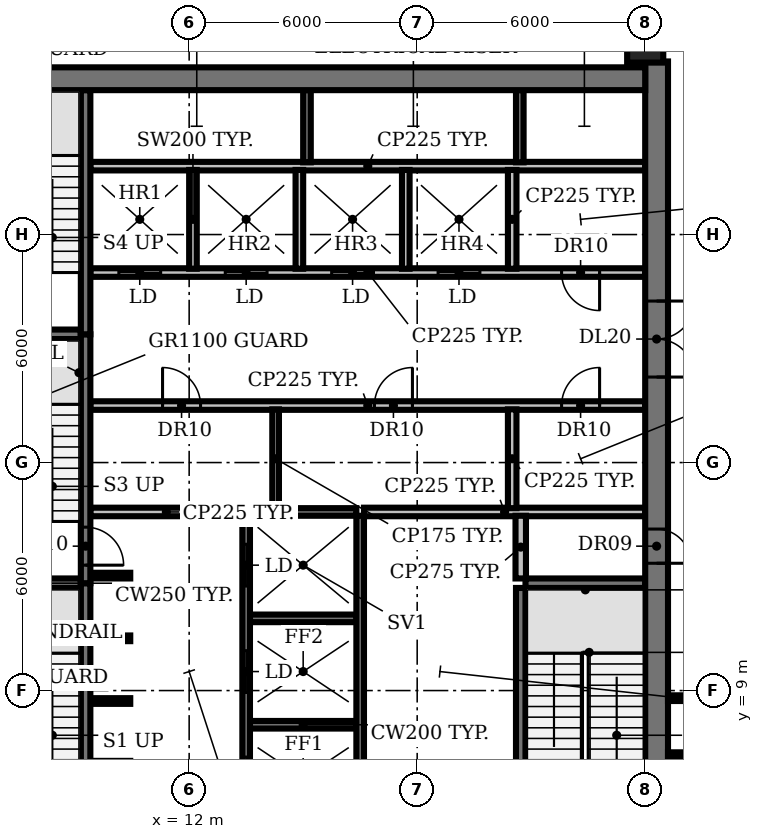
"""IFC4 building model, lengths in metres.
Left out: names, types, materials, properties, quantities, classifications, styles, units other than length and angle.
Written with IfcOpenShell. Run it as: python <this file> out.ifc"""

import sys

from ifc_helpers import new_model, si_unit, direction, frame, frame_2d, origin, origin_2d, place, context, subcontext, project, spatial, rectangle, circle, extrude, element, fill, save


model = new_model("IFC4")
c1 = context("Model", 3, precision=1e-05, world=origin(), true_north=direction((0.0, 1.0)))
c2 = subcontext(c1, "Body", "Model", "MODEL_VIEW")
j1 = project(units=[si_unit("LENGTHUNIT", "METRE"), si_unit("PLANEANGLEUNIT", "RADIAN")], contexts=[c1])
p1 = place(None, origin())
s1 = spatial("IfcSite", under=j1, at=p1, CompositionType="ELEMENT")
p2 = place(p1, origin())
s2 = spatial("IfcBuilding", under=s1, at=p2, CompositionType="ELEMENT")
p3 = place(p2, frame((0.0, 0.0, 184.4)))
s3 = spatial("IfcBuildingStorey", under=s2, at=p3, CompositionType="ELEMENT", Elevation=184.4)
p4 = place(p3, frame((24.0, 26.0, 0.0), z_axis=(0.0, 0.0, 1.0), x_axis=(1.0, 0.0, 0.0)))
e1 = element("IfcColumn", 1, at=p4, inside=s3, PredefinedType="COLUMN", context=c2, shape_type="SweptSolid", body=[
    extrude(circle(Radius=0.475, at=origin_2d()), origin(), (0.0, 0.0, 1.0), 3.85),
])
p5 = place(p3, frame((13.6, 8.1, 0.0), z_axis=(0.0, 0.0, 1.0), x_axis=(1.0, 0.0, 0.0)))
e2 = element("IfcWall", 2, at=p5, inside=s3, PredefinedType="SHEAR", context=c2, shape_type="SweptSolid", body=[
    extrude(rectangle(XDim=2.8, YDim=0.2, at=frame_2d((1.4, 0.0))), origin(), (0.0, 0.0, 1.0), 3.85),
])
for number, where, z_axis, x_axis in (
    (3, (9.4, 8.725, 0.0), (0.0, 0.0, 1.0), (1.0, 0.0, 0.0)),
    (4, (9.4, 10.375, 0.0), (0.0, 0.0, 1.0), (1.0, 0.0, 0.0)),
):
    element("IfcWall", number, at=place(p3, frame(where, z_axis=z_axis, x_axis=x_axis)), inside=s3, PredefinedType="SHEAR", context=c2, shape_type="SweptSolid", body=[
        extrude(rectangle(XDim=1.05, YDim=0.15, at=frame_2d((0.525, 0.0))), origin(), (0.0, 0.0, 1.0), 3.85),
    ])
p6 = place(p3, frame((13.6, 10.9, 0.0), z_axis=(0.0, 0.0, 1.0), x_axis=(1.0, 0.0, 0.0)))
e5 = element("IfcWall", 5, at=p6, inside=s3, PredefinedType="SHEAR", context=c2, shape_type="SweptSolid", body=[
    extrude(rectangle(XDim=2.8, YDim=0.2, at=frame_2d((1.4, 0.0))), origin(), (0.0, 0.0, 1.0), 3.85),
])
for number, where, z_axis, x_axis in (
    (6, (6.0, 11.825, 0.0), (0.0, 0.0, 1.0), (1.0, 0.0, 0.0)),
    (7, (20.85, 11.825, 0.0), (0.0, 0.0, 1.0), (1.0, 0.0, 0.0)),
):
    element("IfcWall", number, at=place(p3, frame(where, z_axis=z_axis, x_axis=x_axis)), inside=s3, PredefinedType="SHEAR", context=c2, shape_type="SweptSolid", body=[
        extrude(rectangle(XDim=3.15, YDim=0.25, at=frame_2d((1.575, 0.0))), origin(), (0.0, 0.0, 1.0), 3.85),
    ])
p7 = place(p3, frame((9.4, 12.025, 0.0), z_axis=(0.0, 0.0, 1.0), x_axis=(1.0, 0.0, 0.0)))
e8 = element("IfcWall", 8, at=p7, inside=s3, PredefinedType="SHEAR", context=c2, shape_type="SweptSolid", body=[
    extrude(rectangle(XDim=1.05, YDim=0.15, at=frame_2d((0.525, 0.0))), origin(), (0.0, 0.0, 1.0), 3.85),
])
p8 = place(p3, frame((9.4, 13.7, 0.0), z_axis=(0.0, 0.0, 1.0), x_axis=(1.0, 0.0, 0.0)))
e9 = element("IfcWall", 9, at=p8, inside=s3, PredefinedType="PARTITIONING", context=c2, shape_type="SweptSolid", body=[
    extrude(rectangle(XDim=4.0, YDim=0.225, at=frame_2d((2.0, 0.0))), origin(), (0.0, 0.0, 1.0), 3.85),
])
p9 = place(p3, frame((13.6, 13.7, 0.0), z_axis=(0.0, 0.0, 1.0), x_axis=(1.0, 0.0, 0.0)))
e10 = element("IfcWall", 10, at=p9, inside=s3, PredefinedType="SHEAR", context=c2, shape_type="SweptSolid", body=[
    extrude(rectangle(XDim=2.8, YDim=0.2, at=frame_2d((1.4, 0.0))), origin(), (0.0, 0.0, 1.0), 3.85),
])
p10 = place(p3, frame((16.6, 13.7, 0.0), z_axis=(0.0, 0.0, 1.0), x_axis=(1.0, 0.0, 0.0)))
e11 = element("IfcWall", 11, at=p10, inside=s3, PredefinedType="PARTITIONING", context=c2, shape_type="SweptSolid", body=[
    extrude(rectangle(XDim=7.4, YDim=0.225, at=frame_2d((3.7, 0.0))), origin(), (0.0, 0.0, 1.0), 3.85),
])
p11 = place(p3, frame((9.4, 16.5, 0.0), z_axis=(0.0, 0.0, 1.0), x_axis=(1.0, 0.0, 0.0)))
e12 = element("IfcWall", 12, at=p11, inside=s3, PredefinedType="PARTITIONING", context=c2, shape_type="SweptSolid", body=[
    extrude(rectangle(XDim=14.6, YDim=0.225, at=frame_2d((7.3, 0.0))), origin(), (0.0, 0.0, 1.0), 3.85),
])
p12 = place(p11, frame((1.9, 0.0, 0.0)))
e13 = element("IfcOpeningElement", 13, at=p12, cuts=e12, PredefinedType="OPENING", context=c2, shape_type="SweptSolid", body=[
    extrude(rectangle(XDim=1.0, YDim=2.1, at=frame_2d((0.5, 1.05))), frame((0.0, 0.123, 0.0), z_axis=(0.0, -1.0, 0.0), x_axis=(1.0, 0.0, 0.0)), (0.0, 0.0, 1.0), 0.245),
])
p13 = place(p11, frame((7.475, 0.0, 0.0)))
e14 = element("IfcOpeningElement", 14, at=p13, cuts=e12, PredefinedType="OPENING", context=c2, shape_type="SweptSolid", body=[
    extrude(rectangle(XDim=1.0, YDim=2.1, at=frame_2d((0.5, 1.05))), frame((0.0, 0.123, 0.0), z_axis=(0.0, -1.0, 0.0), x_axis=(1.0, 0.0, 0.0)), (0.0, 0.0, 1.0), 0.245),
])
p14 = place(p11, frame((12.4, 0.0, 0.0)))
e15 = element("IfcOpeningElement", 15, at=p14, cuts=e12, PredefinedType="OPENING", context=c2, shape_type="SweptSolid", body=[
    extrude(rectangle(XDim=1.0, YDim=2.1, at=frame_2d((0.5, 1.05))), frame((0.0, 0.123, 0.0), z_axis=(0.0, -1.0, 0.0), x_axis=(1.0, 0.0, 0.0)), (0.0, 0.0, 1.0), 0.245),
])
p15 = place(p3, frame((6.0, 18.375, 0.0), z_axis=(0.0, 0.0, 1.0), x_axis=(1.0, 0.0, 0.0)))
e16 = element("IfcWall", 16, at=p15, inside=s3, PredefinedType="SHEAR", context=c2, shape_type="SweptSolid", body=[
    extrude(rectangle(XDim=3.15, YDim=0.25, at=frame_2d((1.575, 0.0))), origin(), (0.0, 0.0, 1.0), 3.85),
])
p16 = place(p3, frame((24.0, 20.0, 0.0), z_axis=(0.0, 0.0, 1.0), x_axis=(-1.0, 0.0, 0.0)))
e17 = element("IfcWall", 17, at=p16, inside=s3, PredefinedType="PARTITIONING", context=c2, shape_type="SweptSolid", body=[
    extrude(rectangle(XDim=14.6, YDim=0.225, at=frame_2d((7.3, 0.0))), origin(), (0.0, 0.0, 1.0), 3.85),
])
p17 = place(p16, frame((12.75, 0.0, 0.0)))
e18 = element("IfcOpeningElement", 18, at=p17, cuts=e17, PredefinedType="OPENING", context=c2, shape_type="SweptSolid", body=[
    extrude(rectangle(XDim=1.1, YDim=2.1, at=frame_2d((0.55, 1.05))), frame((0.0, 0.123, 0.0), z_axis=(0.0, -1.0, 0.0), x_axis=(1.0, 0.0, 0.0)), (0.0, 0.0, 1.0), 0.245),
])
p18 = place(p16, frame((9.95, 0.0, 0.0)))
e19 = element("IfcOpeningElement", 19, at=p18, cuts=e17, PredefinedType="OPENING", context=c2, shape_type="SweptSolid", body=[
    extrude(rectangle(XDim=1.1, YDim=2.1, at=frame_2d((0.55, 1.05))), frame((0.0, 0.123, 0.0), z_axis=(0.0, -1.0, 0.0), x_axis=(1.0, 0.0, 0.0)), (0.0, 0.0, 1.0), 0.245),
])
p19 = place(p16, frame((7.15, 0.0, 0.0)))
e20 = element("IfcOpeningElement", 20, at=p19, cuts=e17, PredefinedType="OPENING", context=c2, shape_type="SweptSolid", body=[
    extrude(rectangle(XDim=1.1, YDim=2.1, at=frame_2d((0.55, 1.05))), frame((0.0, 0.123, 0.0), z_axis=(0.0, -1.0, 0.0), x_axis=(1.0, 0.0, 0.0)), (0.0, 0.0, 1.0), 0.245),
])
p20 = place(p16, frame((4.35, 0.0, 0.0)))
e21 = element("IfcOpeningElement", 21, at=p20, cuts=e17, PredefinedType="OPENING", context=c2, shape_type="SweptSolid", body=[
    extrude(rectangle(XDim=1.1, YDim=2.1, at=frame_2d((0.55, 1.05))), frame((0.0, 0.123, 0.0), z_axis=(0.0, -1.0, 0.0), x_axis=(1.0, 0.0, 0.0)), (0.0, 0.0, 1.0), 0.245),
])
p21 = place(p16, frame((1.2, 0.0, 0.0)))
e22 = element("IfcOpeningElement", 22, at=p21, cuts=e17, PredefinedType="OPENING", context=c2, shape_type="SweptSolid", body=[
    extrude(rectangle(XDim=1.0, YDim=2.1, at=frame_2d((0.5, 1.05))), frame((0.0, 0.123, 0.0), z_axis=(0.0, -1.0, 0.0), x_axis=(1.0, 0.0, 0.0)), (0.0, 0.0, 1.0), 0.245),
])
p22 = place(p3, frame((9.4, 22.8, 0.0), z_axis=(0.0, 0.0, 1.0), x_axis=(1.0, 0.0, 0.0)))
e23 = element("IfcWall", 23, at=p22, inside=s3, PredefinedType="PARTITIONING", context=c2, shape_type="SweptSolid", body=[
    extrude(rectangle(XDim=14.6, YDim=0.225, at=frame_2d((7.3, 0.0))), origin(), (0.0, 0.0, 1.0), 3.85),
])
p23 = place(p3, frame((9.275, 11.825, 0.0), z_axis=(0.0, 0.0, 1.0), x_axis=(0.0, -1.0, 0.0)))
e24 = element("IfcWall", 24, at=p23, inside=s3, PredefinedType="SHEAR", context=c2, shape_type="SweptSolid", body=[
    extrude(rectangle(XDim=6.425, YDim=0.25, at=frame_2d((3.212, 0.0))), origin(), (0.0, 0.0, 1.0), 3.85),
])
p24 = place(p23, frame((5.075, 0.0, 0.0)))
e25 = element("IfcOpeningElement", 25, at=p24, cuts=e24, PredefinedType="OPENING", context=c2, shape_type="SweptSolid", body=[
    extrude(rectangle(XDim=1.0, YDim=2.1, at=frame_2d((0.5, 1.05))), frame((0.0, 0.135, 0.0), z_axis=(0.0, -1.0, 0.0), x_axis=(1.0, 0.0, 0.0)), (0.0, 0.0, 1.0), 0.27),
])
p25 = place(p3, frame((9.275, 18.375, 0.0), z_axis=(0.0, 0.0, 1.0), x_axis=(0.0, -1.0, 0.0)))
e26 = element("IfcWall", 26, at=p25, inside=s3, PredefinedType="SHEAR", context=c2, shape_type="SweptSolid", body=[
    extrude(rectangle(XDim=6.55, YDim=0.25, at=frame_2d((3.275, 0.0))), origin(), (0.0, 0.0, 1.0), 3.85),
])
p26 = place(p25, frame((5.075, 0.0, 0.0)))
e27 = element("IfcOpeningElement", 27, at=p26, cuts=e26, PredefinedType="OPENING", context=c2, shape_type="SweptSolid", body=[
    extrude(rectangle(XDim=1.0, YDim=2.1, at=frame_2d((0.5, 1.05))), frame((0.0, 0.135, 0.0), z_axis=(0.0, -1.0, 0.0), x_axis=(1.0, 0.0, 0.0)), (0.0, 0.0, 1.0), 0.27),
])
p27 = place(p3, frame((9.275, 18.375, 0.0), z_axis=(0.0, 0.0, 1.0), x_axis=(0.0, 1.0, 0.0)))
e28 = element("IfcWall", 28, at=p27, inside=s3, PredefinedType="SHEAR", context=c2, shape_type="SweptSolid", body=[
    extrude(rectangle(XDim=6.425, YDim=0.25, at=frame_2d((3.212, 0.0))), origin(), (0.0, 0.0, 1.0), 3.85),
])
p28 = place(p3, frame((12.1, 20.1, 0.0), z_axis=(0.0, 0.0, 1.0), x_axis=(0.0, 1.0, 0.0)))
e29 = element("IfcWall", 29, at=p28, inside=s3, PredefinedType="SOLIDWALL", context=c2, shape_type="SweptSolid", body=[
    extrude(rectangle(XDim=2.6, YDim=0.2, at=frame_2d((1.3, 0.0))), origin(), (0.0, 0.0, 1.0), 3.85),
])
p29 = place(p3, frame((13.5, 5.4, 0.0), z_axis=(0.0, 0.0, 1.0), x_axis=(0.0, 1.0, 0.0)))
e30 = element("IfcWall", 30, at=p29, inside=s3, PredefinedType="SHEAR", context=c2, shape_type="SweptSolid", body=[
    extrude(rectangle(XDim=8.2, YDim=0.2, at=frame_2d((4.1, 0.0))), origin(), (0.0, 0.0, 1.0), 3.85),
])
p30 = place(p29, frame((0.75, 0.0, 0.0)))
e31 = element("IfcOpeningElement", 31, at=p30, cuts=e30, PredefinedType="OPENING", context=c2, shape_type="SweptSolid", body=[
    extrude(rectangle(XDim=1.1, YDim=2.1, at=frame_2d((0.55, 1.05))), frame((0.0, 0.11, 0.0), z_axis=(0.0, -1.0, 0.0), x_axis=(1.0, 0.0, 0.0)), (0.0, 0.0, 1.0), 0.22),
])
p31 = place(p29, frame((3.55, 0.0, 0.0)))
e32 = element("IfcOpeningElement", 32, at=p31, cuts=e30, PredefinedType="OPENING", context=c2, shape_type="SweptSolid", body=[
    extrude(rectangle(XDim=1.1, YDim=2.1, at=frame_2d((0.55, 1.05))), frame((0.0, 0.11, 0.0), z_axis=(0.0, -1.0, 0.0), x_axis=(1.0, 0.0, 0.0)), (0.0, 0.0, 1.0), 0.22),
])
p32 = place(p29, frame((6.35, 0.0, 0.0)))
e33 = element("IfcOpeningElement", 33, at=p32, cuts=e30, PredefinedType="OPENING", context=c2, shape_type="SweptSolid", body=[
    extrude(rectangle(XDim=1.1, YDim=2.1, at=frame_2d((0.55, 1.05))), frame((0.0, 0.11, 0.0), z_axis=(0.0, -1.0, 0.0), x_axis=(1.0, 0.0, 0.0)), (0.0, 0.0, 1.0), 0.22),
])
p33 = place(p3, frame((14.275, 13.8, 0.0), z_axis=(0.0, 0.0, 1.0), x_axis=(0.0, 1.0, 0.0)))
e34 = element("IfcWall", 34, at=p33, inside=s3, PredefinedType="PARTITIONING", context=c2, shape_type="SweptSolid", body=[
    extrude(rectangle(XDim=2.6, YDim=0.175, at=frame_2d((1.3, 0.0))), origin(), (0.0, 0.0, 1.0), 3.85),
])
p34 = place(p3, frame((14.9, 20.1, 0.0), z_axis=(0.0, 0.0, 1.0), x_axis=(0.0, 1.0, 0.0)))
e35 = element("IfcWall", 35, at=p34, inside=s3, PredefinedType="SOLIDWALL", context=c2, shape_type="SweptSolid", body=[
    extrude(rectangle(XDim=2.6, YDim=0.2, at=frame_2d((1.3, 0.0))), origin(), (0.0, 0.0, 1.0), 3.85),
])
p35 = place(p3, frame((15.1, 22.9, 0.0), z_axis=(0.0, 0.0, 1.0), x_axis=(0.0, 1.0, 0.0)))
e36 = element("IfcWall", 36, at=p35, inside=s3, PredefinedType="SHEAR", context=c2, shape_type="SweptSolid", body=[
    extrude(rectangle(XDim=1.9, YDim=0.2, at=frame_2d((0.95, 0.0))), origin(), (0.0, 0.0, 1.0), 3.85),
])
p36 = place(p3, frame((16.5, 5.4, 0.0), z_axis=(0.0, 0.0, 1.0), x_axis=(0.0, 1.0, 0.0)))
e37 = element("IfcWall", 37, at=p36, inside=s3, PredefinedType="SHEAR", context=c2, shape_type="SweptSolid", body=[
    extrude(rectangle(XDim=8.2, YDim=0.2, at=frame_2d((4.1, 0.0))), origin(), (0.0, 0.0, 1.0), 3.85),
])
p37 = place(p3, frame((17.7, 20.1, 0.0), z_axis=(0.0, 0.0, 1.0), x_axis=(0.0, 1.0, 0.0)))
e38 = element("IfcWall", 38, at=p37, inside=s3, PredefinedType="SOLIDWALL", context=c2, shape_type="SweptSolid", body=[
    extrude(rectangle(XDim=2.6, YDim=0.2, at=frame_2d((1.3, 0.0))), origin(), (0.0, 0.0, 1.0), 3.85),
])
for number, where, z_axis, x_axis in (
    (39, (20.5, 13.8, 0.0), (0.0, 0.0, 1.0), (0.0, 1.0, 0.0)),
    (40, (20.5, 20.1, 0.0), (0.0, 0.0, 1.0), (0.0, 1.0, 0.0)),
):
    element("IfcWall", number, at=place(p3, frame(where, z_axis=z_axis, x_axis=x_axis)), inside=s3, PredefinedType="PARTITIONING", context=c2, shape_type="SweptSolid", body=[
        extrude(rectangle(XDim=2.6, YDim=0.225, at=frame_2d((1.3, 0.0))), origin(), (0.0, 0.0, 1.0), 3.85),
    ])
p38 = place(p3, frame((20.7, 22.9, 0.0), z_axis=(0.0, 0.0, 1.0), x_axis=(0.0, 1.0, 0.0)))
e41 = element("IfcWall", 41, at=p38, inside=s3, PredefinedType="SHEAR", context=c2, shape_type="SweptSolid", body=[
    extrude(rectangle(XDim=1.9, YDim=0.2, at=frame_2d((0.95, 0.0))), origin(), (0.0, 0.0, 1.0), 3.85),
])
p39 = place(p3, frame((20.725, 5.4, 0.0), z_axis=(0.0, 0.0, 1.0), x_axis=(0.0, 1.0, 0.0)))
e42 = element("IfcWall", 42, at=p39, inside=s3, PredefinedType="SHEAR", context=c2, shape_type="SweptSolid", body=[
    extrude(rectangle(XDim=6.3, YDim=0.25, at=frame_2d((3.15, 0.0))), origin(), (0.0, 0.0, 1.0), 3.85),
])
p40 = place(p3, frame((20.725, 11.95, 0.0), z_axis=(0.0, 0.0, 1.0), x_axis=(0.0, 1.0, 0.0)))
e43 = element("IfcWall", 43, at=p40, inside=s3, PredefinedType="PARTITIONING", context=c2, shape_type="SweptSolid", body=[
    extrude(rectangle(XDim=1.65, YDim=0.275, at=frame_2d((0.825, 0.0))), origin(), (0.0, 0.0, 1.0), 3.85),
])
p41 = place(p3, frame((24.3, 25.555, 0.0), z_axis=(0.0, 0.0, 1.0), x_axis=(0.0, -1.0, 0.0)))
e44 = element("IfcWall", 44, at=p41, inside=s3, PredefinedType="SHEAR", context=c2, shape_type="SweptSolid", body=[
    extrude(rectangle(XDim=20.755, YDim=0.6, at=frame_2d((10.377, 0.0))), origin(), (0.0, 0.0, 1.0), 3.85),
])
p42 = place(p41, frame((18.405, 0.0, 0.0)))
e45 = element("IfcOpeningElement", 45, at=p42, cuts=e44, PredefinedType="OPENING", context=c2, shape_type="SweptSolid", body=[
    extrude(rectangle(XDim=1.5, YDim=2.1, at=frame_2d((0.75, 1.05))), frame((0.0, 0.31, 0.0), z_axis=(0.0, -1.0, 0.0), x_axis=(1.0, 0.0, 0.0)), (0.0, 0.0, 1.0), 0.62),
])
p43 = place(p41, frame((12.305, 0.0, 0.0)))
e46 = element("IfcOpeningElement", 46, at=p43, cuts=e44, PredefinedType="OPENING", context=c2, shape_type="SweptSolid", body=[
    extrude(rectangle(XDim=0.9, YDim=2.1, at=frame_2d((0.45, 1.05))), frame((0.0, 0.31, 0.0), z_axis=(0.0, -1.0, 0.0), x_axis=(1.0, 0.0, 0.0)), (0.0, 0.0, 1.0), 0.62),
])
p44 = place(p41, frame((6.305, 0.0, 0.0)))
e47 = element("IfcOpeningElement", 47, at=p44, cuts=e44, PredefinedType="OPENING", context=c2, shape_type="SweptSolid", body=[
    extrude(rectangle(XDim=2.0, YDim=2.1, at=frame_2d((1.0, 1.05))), frame((0.0, 0.31, 0.0), z_axis=(0.0, -1.0, 0.0), x_axis=(1.0, 0.0, 0.0)), (0.0, 0.0, 1.0), 0.62),
])
p45 = place(p3, frame((6.0, 25.1, 0.0), z_axis=(0.0, 0.0, 1.0), x_axis=(1.0, 0.0, 0.0)))
e48 = element("IfcWall", 48, at=p45, inside=s3, PredefinedType="SHEAR", context=c2, shape_type="SweptSolid", body=[
    extrude(rectangle(XDim=18.0, YDim=0.6, at=frame_2d((9.0, 0.0))), origin(), (0.0, 0.0, 1.0), 3.85),
])
for number, where, z_axis, x_axis in (
    (49, (24.6, 7.3, 0.0), (0.0, 0.0, 1.0), (1.0, 0.0, 0.0)),
    (50, (24.6, 8.8, 0.0), (0.0, 0.0, 1.0), (1.0, 0.0, 0.0)),
):
    element("IfcWall", number, at=place(p3, frame(where, z_axis=z_axis, x_axis=x_axis)), inside=s3, PredefinedType="PARTITIONING", context=c2, shape_type="SweptSolid", body=[
        extrude(rectangle(XDim=1.05, YDim=0.15, at=frame_2d((0.525, 0.0))), origin(), (0.0, 0.0, 1.0), 2.88),
    ])
p46 = place(p12, origin())
e51 = element("IfcDoor", 51, at=p46, inside=s3, OperationType="SINGLE_SWING_LEFT", PredefinedType="DOOR", context=c2, shape_type="SweptSolid", body=[
    extrude(rectangle(XDim=1.0, YDim=2.1, at=frame_2d((0.5, 1.05))), frame((0.0, 0.025, 0.0), z_axis=(0.0, -1.0, 0.0), x_axis=(1.0, 0.0, 0.0)), (0.0, 0.0, 1.0), 0.05),
])
fill(e13, e51)
p47 = place(p13, origin())
e52 = element("IfcDoor", 52, at=p47, inside=s3, OperationType="SINGLE_SWING_RIGHT", PredefinedType="DOOR", context=c2, shape_type="SweptSolid", body=[
    extrude(rectangle(XDim=1.0, YDim=2.1, at=frame_2d((0.5, 1.05))), frame((0.0, 0.025, 0.0), z_axis=(0.0, -1.0, 0.0), x_axis=(1.0, 0.0, 0.0)), (0.0, 0.0, 1.0), 0.05),
])
fill(e14, e52)
p48 = place(p14, origin())
e53 = element("IfcDoor", 53, at=p48, inside=s3, OperationType="SINGLE_SWING_RIGHT", PredefinedType="DOOR", context=c2, shape_type="SweptSolid", body=[
    extrude(rectangle(XDim=1.0, YDim=2.1, at=frame_2d((0.5, 1.05))), frame((0.0, 0.025, 0.0), z_axis=(0.0, -1.0, 0.0), x_axis=(1.0, 0.0, 0.0)), (0.0, 0.0, 1.0), 0.05),
])
fill(e15, e53)
p49 = place(p17, origin())
e54 = element("IfcDoor", 54, at=p49, inside=s3, OperationType="DOUBLE_DOOR_SLIDING", PredefinedType="DOOR", context=c2, shape_type="SweptSolid", body=[
    extrude(rectangle(XDim=1.1, YDim=2.1, at=frame_2d((0.55, 1.05))), frame((0.0, 0.025, 0.0), z_axis=(0.0, -1.0, 0.0), x_axis=(1.0, 0.0, 0.0)), (0.0, 0.0, 1.0), 0.05),
])
fill(e18, e54)
p50 = place(p18, origin())
e55 = element("IfcDoor", 55, at=p50, inside=s3, OperationType="DOUBLE_DOOR_SLIDING", PredefinedType="DOOR", context=c2, shape_type="SweptSolid", body=[
    extrude(rectangle(XDim=1.1, YDim=2.1, at=frame_2d((0.55, 1.05))), frame((0.0, 0.025, 0.0), z_axis=(0.0, -1.0, 0.0), x_axis=(1.0, 0.0, 0.0)), (0.0, 0.0, 1.0), 0.05),
])
fill(e19, e55)
p51 = place(p19, origin())
e56 = element("IfcDoor", 56, at=p51, inside=s3, OperationType="DOUBLE_DOOR_SLIDING", PredefinedType="DOOR", context=c2, shape_type="SweptSolid", body=[
    extrude(rectangle(XDim=1.1, YDim=2.1, at=frame_2d((0.55, 1.05))), frame((0.0, 0.025, 0.0), z_axis=(0.0, -1.0, 0.0), x_axis=(1.0, 0.0, 0.0)), (0.0, 0.0, 1.0), 0.05),
])
fill(e20, e56)
p52 = place(p20, origin())
e57 = element("IfcDoor", 57, at=p52, inside=s3, OperationType="DOUBLE_DOOR_SLIDING", PredefinedType="DOOR", context=c2, shape_type="SweptSolid", body=[
    extrude(rectangle(XDim=1.1, YDim=2.1, at=frame_2d((0.55, 1.05))), frame((0.0, 0.025, 0.0), z_axis=(0.0, -1.0, 0.0), x_axis=(1.0, 0.0, 0.0)), (0.0, 0.0, 1.0), 0.05),
])
fill(e21, e57)
p53 = place(p21, origin())
e58 = element("IfcDoor", 58, at=p53, inside=s3, OperationType="SINGLE_SWING_LEFT", PredefinedType="DOOR", context=c2, shape_type="SweptSolid", body=[
    extrude(rectangle(XDim=1.0, YDim=2.1, at=frame_2d((0.5, 1.05))), frame((0.0, 0.025, 0.0), z_axis=(0.0, -1.0, 0.0), x_axis=(1.0, 0.0, 0.0)), (0.0, 0.0, 1.0), 0.05),
])
fill(e22, e58)
p54 = place(p26, origin())
e59 = element("IfcDoor", 59, at=p54, inside=s3, OperationType="SINGLE_SWING_RIGHT", PredefinedType="DOOR", context=c2, shape_type="SweptSolid", body=[
    extrude(rectangle(XDim=1.0, YDim=2.1, at=frame_2d((0.5, 1.05))), frame((0.0, 0.025, 0.0), z_axis=(0.0, -1.0, 0.0), x_axis=(1.0, 0.0, 0.0)), (0.0, 0.0, 1.0), 0.05),
])
fill(e27, e59)
p55 = place(p30, origin())
e60 = element("IfcDoor", 60, at=p55, inside=s3, OperationType="DOUBLE_DOOR_SLIDING", PredefinedType="DOOR", context=c2, shape_type="SweptSolid", body=[
    extrude(rectangle(XDim=1.1, YDim=2.1, at=frame_2d((0.55, 1.05))), frame((0.0, 0.025, 0.0), z_axis=(0.0, -1.0, 0.0), x_axis=(1.0, 0.0, 0.0)), (0.0, 0.0, 1.0), 0.05),
])
fill(e31, e60)
p56 = place(p31, origin())
e61 = element("IfcDoor", 61, at=p56, inside=s3, OperationType="DOUBLE_DOOR_SLIDING", PredefinedType="DOOR", context=c2, shape_type="SweptSolid", body=[
    extrude(rectangle(XDim=1.1, YDim=2.1, at=frame_2d((0.55, 1.05))), frame((0.0, 0.025, 0.0), z_axis=(0.0, -1.0, 0.0), x_axis=(1.0, 0.0, 0.0)), (0.0, 0.0, 1.0), 0.05),
])
fill(e32, e61)
p57 = place(p32, origin())
e62 = element("IfcDoor", 62, at=p57, inside=s3, OperationType="DOUBLE_DOOR_SLIDING", PredefinedType="DOOR", context=c2, shape_type="SweptSolid", body=[
    extrude(rectangle(XDim=1.1, YDim=2.1, at=frame_2d((0.55, 1.05))), frame((0.0, 0.025, 0.0), z_axis=(0.0, -1.0, 0.0), x_axis=(1.0, 0.0, 0.0)), (0.0, 0.0, 1.0), 0.05),
])
fill(e33, e62)
p58 = place(p43, origin())
e63 = element("IfcDoor", 63, at=p58, inside=s3, OperationType="SINGLE_SWING_RIGHT", PredefinedType="DOOR", context=c2, shape_type="SweptSolid", body=[
    extrude(rectangle(XDim=0.9, YDim=2.1, at=frame_2d((0.45, 1.05))), frame((0.0, -0.24, 0.0), z_axis=(0.0, -1.0, 0.0), x_axis=(1.0, 0.0, 0.0)), (0.0, 0.0, 1.0), 0.05),
])
fill(e46, e63)
p59 = place(p44, origin())
e64 = element("IfcDoor", 64, at=p59, inside=s3, OperationType="DOUBLE_DOOR_SINGLE_SWING", PredefinedType="DOOR", context=c2, shape_type="SweptSolid", body=[
    extrude(rectangle(XDim=2.0, YDim=2.1, at=frame_2d((1.0, 1.05))), frame((0.0, 0.025, 0.0), z_axis=(0.0, -1.0, 0.0), x_axis=(1.0, 0.0, 0.0)), (0.0, 0.0, 1.0), 0.05),
])
fill(e47, e64)
save(model, sys.argv[1])
